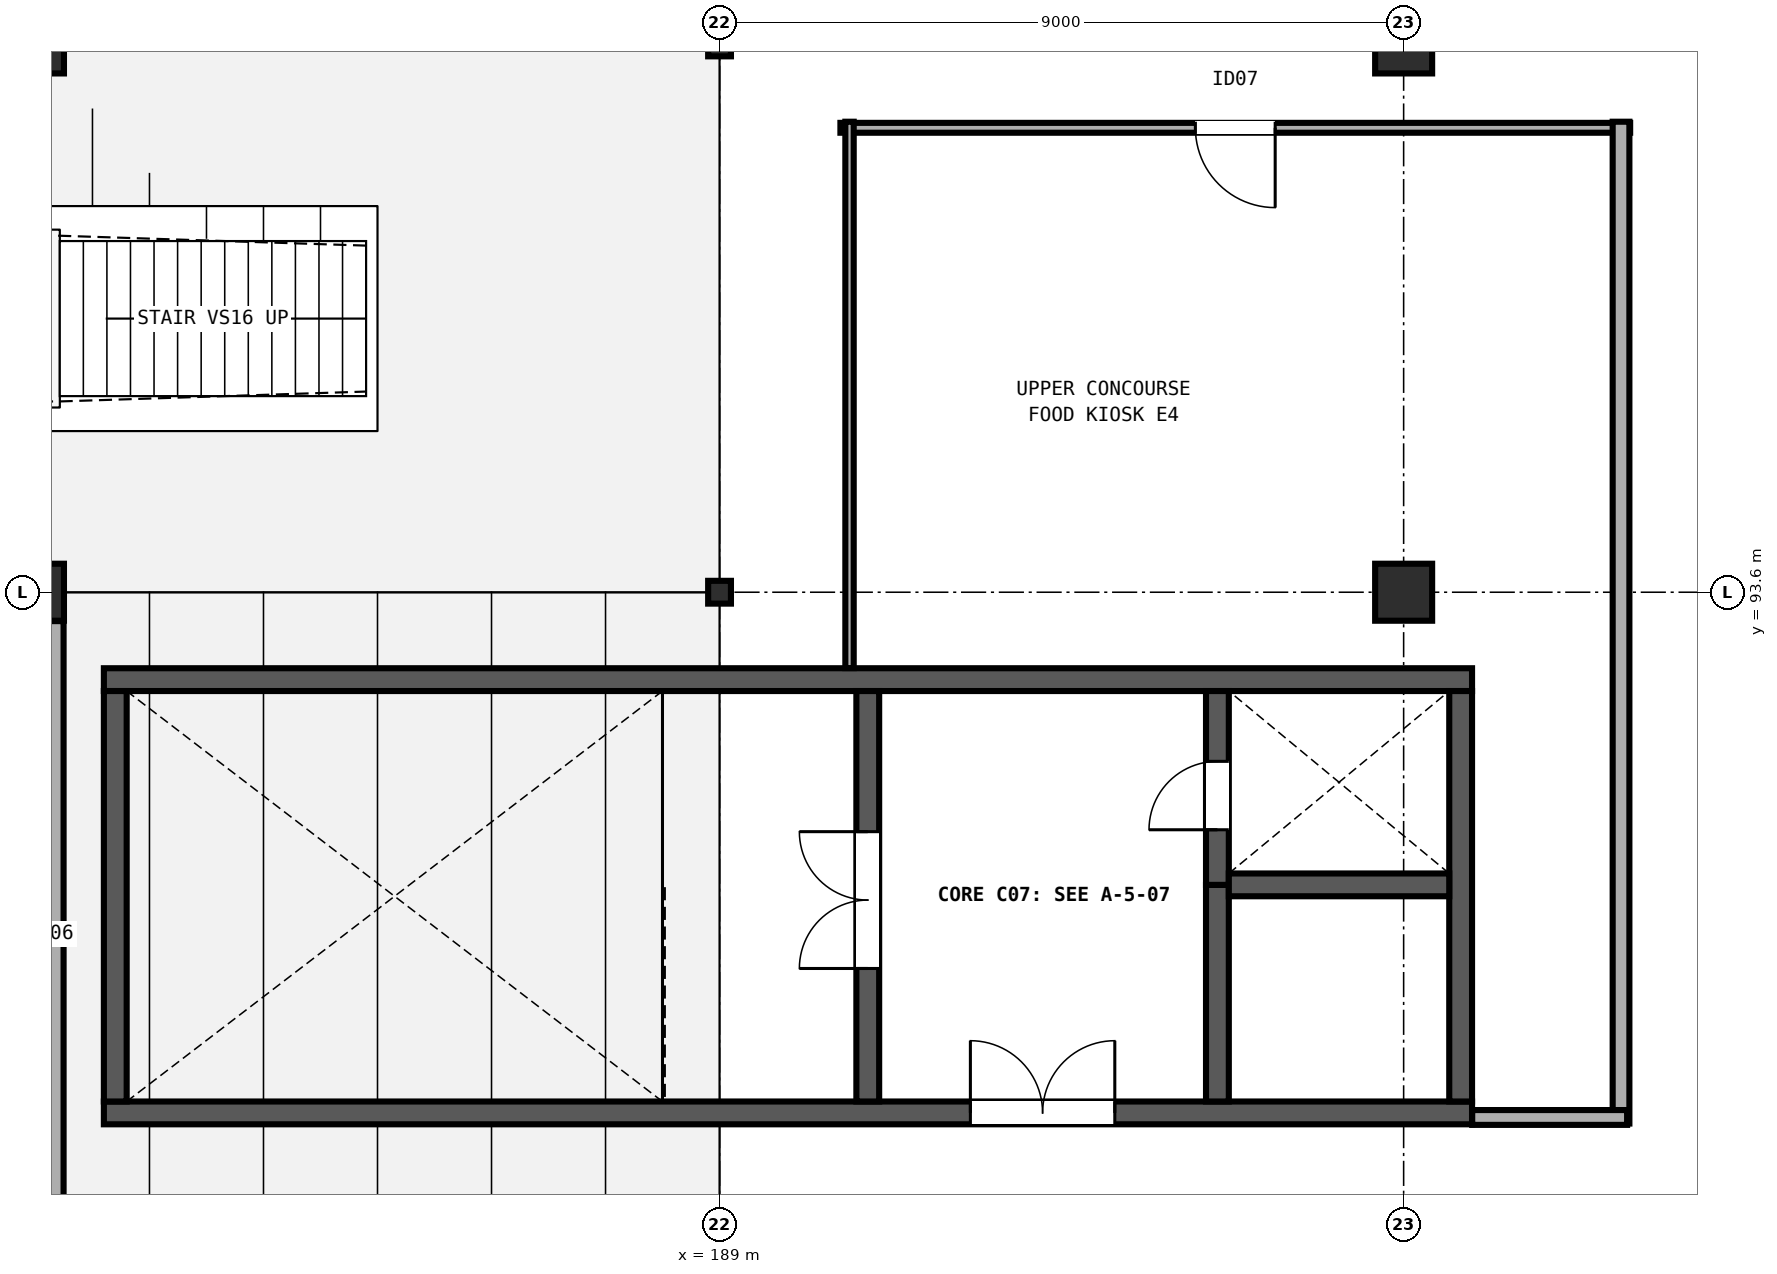
"""IFC4 building model, lengths in metres.
Left out: names, types, materials, properties, quantities, classifications, styles, units other than length and angle.
Written with IfcOpenShell. Run it as: python <this file> out.ifc"""

import sys

from ifc_helpers import new_model, si_unit, direction, frame, frame_2d, origin, origin_2d, place, context, subcontext, project, spatial, rectangle, hollow_rectangle, extrude, element, fill, save


model = new_model("IFC4")
c1 = context("Model", 3, precision=1e-05, world=origin(), true_north=direction((0.0, 1.0)))
c2 = subcontext(c1, "Body", "Model", "MODEL_VIEW")
j1 = project(units=[si_unit("LENGTHUNIT", "METRE"), si_unit("PLANEANGLEUNIT", "RADIAN")], contexts=[c1])
p1 = place(None, origin())
s1 = spatial("IfcSite", under=j1, at=p1, CompositionType="ELEMENT")
p2 = place(p1, origin())
s2 = spatial("IfcBuilding", under=s1, at=p2, CompositionType="ELEMENT")
p3 = place(p2, frame((0.0, 0.0, 19.2)))
s3 = spatial("IfcBuildingStorey", under=s2, at=p3, CompositionType="ELEMENT", Elevation=19.2)
for number, where, z_axis, x_axis in (
    (1, (180.0, 93.6, 0.0), (0.0, 0.0, 1.0), (1.0, 0.0, 0.0)),
    (2, (180.0, 100.8, 0.0), (0.0, 0.0, 1.0), (1.0, 0.0, 0.0)),
):
    element("IfcColumn", number, at=place(p3, frame(where, z_axis=z_axis, x_axis=x_axis)), inside=s3, PredefinedType="COLUMN", context=c2, shape_type="SweptSolid", body=[
        extrude(rectangle(XDim=0.75, YDim=0.75, at=origin_2d()), origin(), (0.0, 0.0, 1.0), 4.8),
    ])
for number, where, z_axis, x_axis in (
    (3, (189.0, 93.6, 0.0), (0.0, 0.0, 1.0), (1.0, 0.0, 0.0)),
    (4, (189.0, 100.8, 0.0), (0.0, 0.0, 1.0), (1.0, 0.0, 0.0)),
):
    element("IfcColumn", number, at=place(p3, frame(where, z_axis=z_axis, x_axis=x_axis)), inside=s3, PredefinedType="COLUMN", context=c2, shape_type="SweptSolid", body=[
        extrude(hollow_rectangle(XDim=0.3, YDim=0.3, WallThickness=0.012, at=origin_2d()), origin(), (0.0, 0.0, 1.0), 4.8),
    ])
for number, where, z_axis, x_axis in (
    (5, (198.0, 93.6, 0.0), (0.0, 0.0, 1.0), (1.0, 0.0, 0.0)),
    (6, (198.0, 100.8, 0.0), (0.0, 0.0, 1.0), (1.0, 0.0, 0.0)),
):
    element("IfcColumn", number, at=place(p3, frame(where, z_axis=z_axis, x_axis=x_axis)), inside=s3, PredefinedType="COLUMN", context=c2, shape_type="SweptSolid", body=[
        extrude(rectangle(XDim=0.75, YDim=0.75, at=origin_2d()), origin(), (0.0, 0.0, 1.0), 4.8),
    ])
p4 = place(p3, frame((180.9, 86.75, 0.0), z_axis=(0.0, 0.0, 1.0), x_axis=(1.0, 0.0, 0.0)))
e7 = element("IfcWall", 7, at=p4, inside=s3, PredefinedType="SHEAR", context=c2, shape_type="SweptSolid", body=[
    extrude(rectangle(XDim=18.0, YDim=0.3, at=frame_2d((9.0, 0.0))), origin(), (0.0, 0.0, 1.0), 4.555),
])
p5 = place(p4, frame((11.4, 0.0, 0.0)))
e8 = element("IfcOpeningElement", 8, at=p5, cuts=e7, PredefinedType="OPENING", context=c2, shape_type="SweptSolid", body=[
    extrude(rectangle(XDim=1.9, YDim=2.25, at=frame_2d((0.95, 1.125))), frame((0.0, 0.16, 0.0), z_axis=(0.0, -1.0, 0.0), x_axis=(1.0, 0.0, 0.0)), (0.0, 0.0, 1.0), 0.32),
])
p6 = place(p3, frame((198.9, 92.45, 0.0), z_axis=(0.0, 0.0, 1.0), x_axis=(-1.0, 0.0, 0.0)))
e9 = element("IfcWall", 9, at=p6, inside=s3, PredefinedType="SHEAR", context=c2, shape_type="SweptSolid", body=[
    extrude(rectangle(XDim=18.0, YDim=0.3, at=frame_2d((9.0, 0.0))), origin(), (0.0, 0.0, 1.0), 4.555),
])
for number, where, z_axis, x_axis in (
    (10, (181.05, 92.3, 0.0), (0.0, 0.0, 1.0), (0.0, -1.0, 0.0)),
    (11, (198.75, 86.9, 0.0), (0.0, 0.0, 1.0), (0.0, 1.0, 0.0)),
):
    element("IfcWall", number, at=place(p3, frame(where, z_axis=z_axis, x_axis=x_axis)), inside=s3, PredefinedType="SHEAR", context=c2, shape_type="SweptSolid", body=[
        extrude(rectangle(XDim=5.4, YDim=0.3, at=frame_2d((2.7, 0.0))), origin(), (0.0, 0.0, 1.0), 4.555),
    ])
p7 = place(p3, frame((190.95, 86.9, 0.0), z_axis=(0.0, 0.0, 1.0), x_axis=(0.0, 1.0, 0.0)))
e12 = element("IfcWall", 12, at=p7, inside=s3, PredefinedType="SHEAR", context=c2, shape_type="SweptSolid", body=[
    extrude(rectangle(XDim=5.4, YDim=0.3, at=frame_2d((2.7, 0.0))), origin(), (0.0, 0.0, 1.0), 4.555),
])
p8 = place(p7, frame((1.75, 0.0, 0.0)))
e13 = element("IfcOpeningElement", 13, at=p8, cuts=e12, PredefinedType="OPENING", context=c2, shape_type="SweptSolid", body=[
    extrude(rectangle(XDim=1.8, YDim=2.25, at=frame_2d((0.9, 1.125))), frame((0.0, 0.16, 0.0), z_axis=(0.0, -1.0, 0.0), x_axis=(1.0, 0.0, 0.0)), (0.0, 0.0, 1.0), 0.32),
])
p9 = place(p3, frame((195.55, 86.9, 0.0), z_axis=(0.0, 0.0, 1.0), x_axis=(0.0, 1.0, 0.0)))
e14 = element("IfcWall", 14, at=p9, inside=s3, PredefinedType="SHEAR", context=c2, shape_type="SweptSolid", body=[
    extrude(rectangle(XDim=2.85, YDim=0.3, at=frame_2d((1.425, 0.0))), origin(), (0.0, 0.0, 1.0), 4.555),
])
p10 = place(p3, frame((195.55, 89.75, 0.0), z_axis=(0.0, 0.0, 1.0), x_axis=(0.0, 1.0, 0.0)))
e15 = element("IfcWall", 15, at=p10, inside=s3, PredefinedType="SHEAR", context=c2, shape_type="SweptSolid", body=[
    extrude(rectangle(XDim=2.55, YDim=0.3, at=frame_2d((1.275, 0.0))), origin(), (0.0, 0.0, 1.0), 4.555),
])
p11 = place(p10, frame((0.725, 0.0, 0.0)))
e16 = element("IfcOpeningElement", 16, at=p11, cuts=e15, PredefinedType="OPENING", context=c2, shape_type="SweptSolid", body=[
    extrude(rectangle(XDim=0.9, YDim=2.1, at=frame_2d((0.45, 1.05))), frame((0.0, 0.16, 0.0), z_axis=(0.0, -1.0, 0.0), x_axis=(1.0, 0.0, 0.0)), (0.0, 0.0, 1.0), 0.32),
])
p12 = place(p3, frame((195.7, 89.75, 0.0), z_axis=(0.0, 0.0, 1.0), x_axis=(1.0, 0.0, 0.0)))
e17 = element("IfcWall", 17, at=p12, inside=s3, PredefinedType="SHEAR", context=c2, shape_type="SweptSolid", body=[
    extrude(rectangle(XDim=2.9, YDim=0.3, at=frame_2d((1.45, 0.0))), origin(), (0.0, 0.0, 1.0), 4.555),
])
p13 = place(p3, frame((180.2, 84.98, 0.0), z_axis=(0.0, 0.0, 1.0), x_axis=(0.0, 1.0, 0.0)))
e18 = element("IfcWall", 18, at=p13, inside=s3, PredefinedType="SOLIDWALL", context=c2, shape_type="SweptSolid", body=[
    extrude(rectangle(XDim=8.24, YDim=0.34, at=frame_2d((4.12, 0.0))), origin(), (0.0, 0.0, 1.0), 3.28),
])
p14 = place(p3, frame((200.98, 99.71, 0.0), z_axis=(0.0, 0.0, 1.0), x_axis=(-1.0, 0.0, 0.0)))
e19 = element("IfcWall", 19, at=p14, inside=s3, PredefinedType="PARTITIONING", context=c2, shape_type="SweptSolid", body=[
    extrude(rectangle(XDim=10.39, YDim=0.13, at=frame_2d((5.195, 0.0))), origin(), (0.0, 0.0, 1.0), 3.28),
])
p15 = place(p14, frame((4.67, 0.0, 0.0)))
e20 = element("IfcOpeningElement", 20, at=p15, cuts=e19, PredefinedType="OPENING", context=c2, shape_type="SweptSolid", body=[
    extrude(rectangle(XDim=1.05, YDim=2.1, at=frame_2d((0.525, 1.05))), frame((0.0, 0.075, 0.0), z_axis=(0.0, -1.0, 0.0), x_axis=(1.0, 0.0, 0.0)), (0.0, 0.0, 1.0), 0.15),
])
p16 = place(p3, frame((190.71, 92.602, 0.0), z_axis=(0.0, 0.0, 1.0), x_axis=(0.0, 1.0, 0.0)))
e21 = element("IfcWall", 21, at=p16, inside=s3, PredefinedType="PARTITIONING", context=c2, shape_type="SweptSolid", body=[
    extrude(rectangle(XDim=7.188, YDim=0.11, at=frame_2d((3.594, 0.0))), origin(), (0.0, 0.0, 1.0), 3.28),
])
p17 = place(p3, frame((200.86, 99.79, 0.0), z_axis=(0.0, 0.0, 1.0), x_axis=(0.0, -1.0, 0.0)))
e22 = element("IfcWall", 22, at=p17, inside=s3, PredefinedType="PARTITIONING", context=c2, shape_type="SweptSolid", body=[
    extrude(rectangle(XDim=13.18, YDim=0.22, at=frame_2d((6.59, 0.0))), origin(), (0.0, 0.0, 1.0), 3.28),
])
p18 = place(p3, frame((200.94, 86.69, 0.0), z_axis=(0.0, 0.0, 1.0), x_axis=(-1.0, 0.0, 0.0)))
e23 = element("IfcWall", 23, at=p18, inside=s3, PredefinedType="PARTITIONING", context=c2, shape_type="SweptSolid", body=[
    extrude(rectangle(XDim=2.038, YDim=0.195, at=frame_2d((1.019, 0.0))), origin(), (0.0, 0.0, 1.0), 3.28),
])
p19 = place(p8, origin())
e24 = element("IfcDoor", 24, at=p19, inside=s3, OperationType="DOUBLE_DOOR_SINGLE_SWING", PredefinedType="DOOR", context=c2, shape_type="SweptSolid", body=[
    extrude(rectangle(XDim=1.8, YDim=2.25, at=frame_2d((0.9, 1.125))), frame((0.0, 0.025, 0.0), z_axis=(0.0, -1.0, 0.0), x_axis=(1.0, 0.0, 0.0)), (0.0, 0.0, 1.0), 0.05),
])
fill(e13, e24)
p20 = place(p11, origin())
e25 = element("IfcDoor", 25, at=p20, inside=s3, OperationType="SINGLE_SWING_LEFT", PredefinedType="DOOR", context=c2, shape_type="SweptSolid", body=[
    extrude(rectangle(XDim=0.9, YDim=2.1, at=frame_2d((0.45, 1.05))), frame((0.0, 0.025, 0.0), z_axis=(0.0, -1.0, 0.0), x_axis=(1.0, 0.0, 0.0)), (0.0, 0.0, 1.0), 0.05),
])
fill(e16, e25)
p21 = place(p5, origin())
e26 = element("IfcDoor", 26, at=p21, inside=s3, OperationType="DOUBLE_DOOR_SINGLE_SWING", PredefinedType="DOOR", context=c2, shape_type="SweptSolid", body=[
    extrude(rectangle(XDim=1.9, YDim=2.25, at=frame_2d((0.95, 1.125))), frame((0.0, 0.025, 0.0), z_axis=(0.0, -1.0, 0.0), x_axis=(1.0, 0.0, 0.0)), (0.0, 0.0, 1.0), 0.05),
])
fill(e8, e26)
p22 = place(p15, origin())
e27 = element("IfcDoor", 27, at=p22, inside=s3, OperationType="SINGLE_SWING_LEFT", PredefinedType="DOOR", context=c2, shape_type="SweptSolid", body=[
    extrude(rectangle(XDim=1.05, YDim=2.1, at=frame_2d((0.525, 1.05))), frame((0.0, 0.025, 0.0), z_axis=(0.0, -1.0, 0.0), x_axis=(1.0, 0.0, 0.0)), (0.0, 0.0, 1.0), 0.05),
])
fill(e20, e27)
save(model, sys.argv[1])
